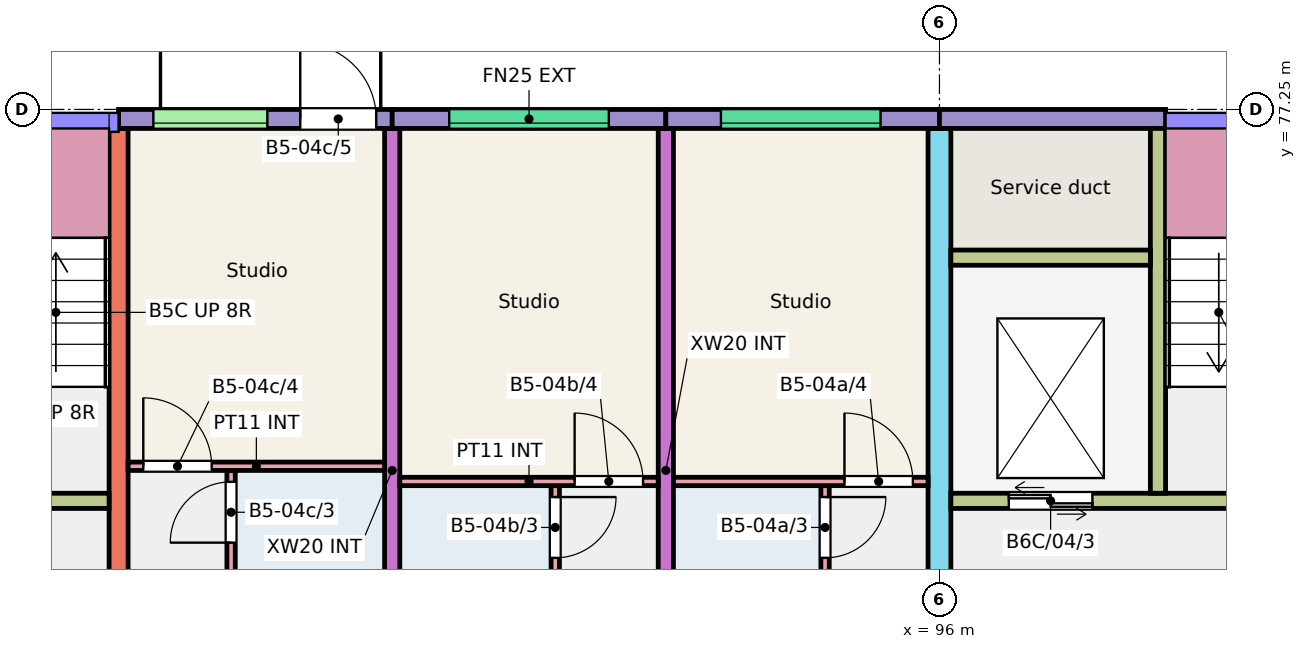
"""IFC4 building model, lengths in metres.
Left out: names, types, materials, properties, quantities, classifications, styles, units other than length and angle.
Written with IfcOpenShell. Run it as: python <this file> out.ifc"""

import sys

from ifc_helpers import new_model, si_unit, direction, frame, frame_2d, origin, place, context, subcontext, project, spatial, rectangle, extrude, element, fill, save


model = new_model("IFC4")
c1 = context("Model", 3, precision=1e-05, world=origin(), true_north=direction((0.0, 1.0)))
c2 = subcontext(c1, "Body", "Model", "MODEL_VIEW")
j1 = project(units=[si_unit("LENGTHUNIT", "METRE"), si_unit("PLANEANGLEUNIT", "RADIAN")], contexts=[c1])
p1 = place(None, origin())
s1 = spatial("IfcSite", under=j1, at=p1, CompositionType="ELEMENT")
p2 = place(p1, origin())
s2 = spatial("IfcBuilding", under=s1, at=p2, CompositionType="ELEMENT")
p3 = place(p2, frame((0.0, 0.0, 12.0)))
s3 = spatial("IfcBuildingStorey", under=s2, at=p3, CompositionType="ELEMENT", Elevation=12.0)
p4 = place(p3, frame((85.2, 68.0, 0.0), z_axis=(0.0, 0.0, 1.0), x_axis=(0.0, 1.0, 0.0)))
e1 = element("IfcWall", 1, at=p4, inside=s3, PredefinedType="SHEAR", context=c2, shape_type="SweptSolid", body=[
    extrude(rectangle(XDim=9.0, YDim=0.25, at=frame_2d((4.5, 0.0))), origin(), (0.0, 0.0, 1.0), 3.0),
])
for number, where, z_axis, x_axis in (
    (2, (88.8, 68.0, 0.0), (0.0, 0.0, 1.0), (0.0, 1.0, 0.0)),
    (3, (92.4, 68.0, 0.0), (0.0, 0.0, 1.0), (0.0, 1.0, 0.0)),
):
    element("IfcWall", number, at=place(p3, frame(where, z_axis=z_axis, x_axis=x_axis)), inside=s3, PredefinedType="SHEAR", context=c2, shape_type="SweptSolid", body=[
        extrude(rectangle(XDim=9.0, YDim=0.2, at=frame_2d((4.5, 0.0))), origin(), (0.0, 0.0, 1.0), 3.0),
    ])
p5 = place(p3, frame((96.0, 66.0, 0.0), z_axis=(0.0, 0.0, 1.0), x_axis=(0.0, 1.0, 0.0)))
e4 = element("IfcWall", 4, at=p5, inside=s3, PredefinedType="SHEAR", context=c2, shape_type="SweptSolid", body=[
    extrude(rectangle(XDim=11.0, YDim=0.3, at=frame_2d((5.5, 0.0))), origin(), (0.0, 0.0, 1.0), 3.0),
])
p6 = place(p5, frame((0.3, 0.0, 0.0)))
e5 = element("IfcOpeningElement", 5, at=p6, cuts=e4, PredefinedType="OPENING", context=c2, shape_type="SweptSolid", body=[
    extrude(rectangle(XDim=1.2, YDim=2.1, at=frame_2d((0.6, 1.05))), frame((0.0, 0.16, 0.0), z_axis=(0.0, -1.0, 0.0), x_axis=(1.0, 0.0, 0.0)), (0.0, 0.0, 1.0), 0.32),
])
p7 = place(p3, frame((79.35, 72.1, 0.0), z_axis=(0.0, 0.0, 1.0), x_axis=(1.0, 0.0, 0.0)))
e6 = element("IfcWall", 6, at=p7, inside=s3, PredefinedType="SHEAR", context=c2, shape_type="SweptSolid", body=[
    extrude(rectangle(XDim=5.725, YDim=0.2, at=frame_2d((2.862, 0.0))), origin(), (0.0, 0.0, 1.0), 3.0),
])
p8 = place(p7, frame((3.775, 0.0, 0.0)))
e7 = element("IfcOpeningElement", 7, at=p8, cuts=e6, PredefinedType="OPENING", context=c2, shape_type="SweptSolid", body=[
    extrude(rectangle(XDim=1.0, YDim=2.1, at=frame_2d((0.5, 1.05))), frame((0.0, 0.11, 0.0), z_axis=(0.0, -1.0, 0.0), x_axis=(1.0, 0.0, 0.0)), (0.0, 0.0, 1.0), 0.22),
])
p9 = place(p7, frame((0.762, 0.0, 0.0)))
e8 = element("IfcOpeningElement", 8, at=p9, cuts=e6, PredefinedType="OPENING", context=c2, shape_type="SweptSolid", body=[
    extrude(rectangle(XDim=1.1, YDim=2.1, at=frame_2d((0.55, 1.05))), frame((0.0, 0.11, 0.0), z_axis=(0.0, -1.0, 0.0), x_axis=(1.0, 0.0, 0.0)), (0.0, 0.0, 1.0), 0.22),
])
p10 = place(p3, frame((85.2, 77.125, 0.0), z_axis=(0.0, 0.0, 1.0), x_axis=(1.0, 0.0, 0.0)))
e9 = element("IfcWall", 9, at=p10, inside=s3, PredefinedType="SOLIDWALL", context=c2, shape_type="SweptSolid", body=[
    extrude(rectangle(XDim=3.6, YDim=0.25, at=frame_2d((1.8, 0.0))), origin(), (0.0, 0.0, 1.0), 3.0),
])
p11 = place(p10, frame((0.458, 0.0, 1.2)))
e10 = element("IfcOpeningElement", 10, at=p11, cuts=e9, PredefinedType="OPENING", context=c2, shape_type="SweptSolid", body=[
    extrude(rectangle(XDim=1.5, YDim=1.2, at=frame_2d((0.75, 0.6))), frame((0.0, 0.135, 0.0), z_axis=(0.0, -1.0, 0.0), x_axis=(1.0, 0.0, 0.0)), (0.0, 0.0, 1.0), 0.27),
])
p12 = place(p10, frame((2.39, 0.0, 0.0)))
e11 = element("IfcOpeningElement", 11, at=p12, cuts=e9, PredefinedType="OPENING", context=c2, shape_type="SweptSolid", body=[
    extrude(rectangle(XDim=1.0, YDim=2.1, at=frame_2d((0.5, 1.05))), frame((0.0, 0.135, 0.0), z_axis=(0.0, -1.0, 0.0), x_axis=(1.0, 0.0, 0.0)), (0.0, 0.0, 1.0), 0.27),
])
p13 = place(p3, frame((88.8, 77.125, 0.0), z_axis=(0.0, 0.0, 1.0), x_axis=(1.0, 0.0, 0.0)))
e12 = element("IfcWall", 12, at=p13, inside=s3, PredefinedType="SOLIDWALL", context=c2, shape_type="SweptSolid", body=[
    extrude(rectangle(XDim=3.6, YDim=0.25, at=frame_2d((1.8, 0.0))), origin(), (0.0, 0.0, 1.0), 3.0),
])
p14 = place(p13, frame((0.75, 0.0, 1.2)))
e13 = element("IfcOpeningElement", 13, at=p14, cuts=e12, PredefinedType="OPENING", context=c2, shape_type="SweptSolid", body=[
    extrude(rectangle(XDim=2.1, YDim=1.2, at=frame_2d((1.05, 0.6))), frame((0.0, 0.135, 0.0), z_axis=(0.0, -1.0, 0.0), x_axis=(1.0, 0.0, 0.0)), (0.0, 0.0, 1.0), 0.27),
])
p15 = place(p3, frame((92.4, 77.125, 0.0), z_axis=(0.0, 0.0, 1.0), x_axis=(1.0, 0.0, 0.0)))
e14 = element("IfcWall", 14, at=p15, inside=s3, PredefinedType="SOLIDWALL", context=c2, shape_type="SweptSolid", body=[
    extrude(rectangle(XDim=3.6, YDim=0.25, at=frame_2d((1.8, 0.0))), origin(), (0.0, 0.0, 1.0), 3.0),
])
p16 = place(p15, frame((0.725, 0.0, 1.2)))
e15 = element("IfcOpeningElement", 15, at=p16, cuts=e14, PredefinedType="OPENING", context=c2, shape_type="SweptSolid", body=[
    extrude(rectangle(XDim=2.1, YDim=1.2, at=frame_2d((1.05, 0.6))), frame((0.0, 0.135, 0.0), z_axis=(0.0, -1.0, 0.0), x_axis=(1.0, 0.0, 0.0)), (0.0, 0.0, 1.0), 0.27),
])
p17 = place(p3, frame((96.0, 77.125, 0.0), z_axis=(0.0, 0.0, 1.0), x_axis=(1.0, 0.0, 0.0)))
e16 = element("IfcWall", 16, at=p17, inside=s3, PredefinedType="SOLIDWALL", context=c2, shape_type="SweptSolid", body=[
    extrude(rectangle(XDim=2.975, YDim=0.25, at=frame_2d((1.488, 0.0))), origin(), (0.0, 0.0, 1.0), 3.0),
])
p18 = place(p3, frame((96.15, 72.1, 0.0), z_axis=(0.0, 0.0, 1.0), x_axis=(1.0, 0.0, 0.0)))
e17 = element("IfcWall", 17, at=p18, inside=s3, PredefinedType="SHEAR", context=c2, shape_type="SweptSolid", body=[
    extrude(rectangle(XDim=5.725, YDim=0.2, at=frame_2d((2.863, 0.0))), origin(), (0.0, 0.0, 1.0), 3.0),
])
p19 = place(p18, frame((3.775, 0.0, 0.0)))
e18 = element("IfcOpeningElement", 18, at=p19, cuts=e17, PredefinedType="OPENING", context=c2, shape_type="SweptSolid", body=[
    extrude(rectangle(XDim=1.0, YDim=2.1, at=frame_2d((0.5, 1.05))), frame((0.0, 0.11, 0.0), z_axis=(0.0, -1.0, 0.0), x_axis=(1.0, 0.0, 0.0)), (0.0, 0.0, 1.0), 0.22),
])
p20 = place(p18, frame((0.762, 0.0, 0.0)))
e19 = element("IfcOpeningElement", 19, at=p20, cuts=e17, PredefinedType="OPENING", context=c2, shape_type="SweptSolid", body=[
    extrude(rectangle(XDim=1.1, YDim=2.1, at=frame_2d((0.55, 1.05))), frame((0.0, 0.11, 0.0), z_axis=(0.0, -1.0, 0.0), x_axis=(1.0, 0.0, 0.0)), (0.0, 0.0, 1.0), 0.22),
])
p21 = place(p3, frame((98.875, 72.2, 0.0), z_axis=(0.0, 0.0, 1.0), x_axis=(0.0, 1.0, 0.0)))
e20 = element("IfcWall", 20, at=p21, inside=s3, PredefinedType="SHEAR", context=c2, shape_type="SweptSolid", body=[
    extrude(rectangle(XDim=4.8, YDim=0.2, at=frame_2d((2.4, 0.0))), origin(), (0.0, 0.0, 1.0), 3.0),
])
p22 = place(p3, frame((96.15, 75.3, 0.0), z_axis=(0.0, 0.0, 1.0), x_axis=(1.0, 0.0, 0.0)))
e21 = element("IfcWall", 21, at=p22, inside=s3, PredefinedType="SHEAR", context=c2, shape_type="SweptSolid", body=[
    extrude(rectangle(XDim=2.625, YDim=0.2, at=frame_2d((1.312, 0.0))), origin(), (0.0, 0.0, 1.0), 3.0),
])
p23 = place(p3, frame((94.495, 68.0, 0.0), z_axis=(0.0, 0.0, 1.0), x_axis=(0.0, 1.0, 0.0)))
e22 = element("IfcWall", 22, at=p23, inside=s3, PredefinedType="PARTITIONING", context=c2, shape_type="SweptSolid", body=[
    extrude(rectangle(XDim=4.3, YDim=0.11, at=frame_2d((2.15, 0.0))), origin(), (0.0, 0.0, 1.0), 2.8),
])
p24 = place(p23, frame((0.2, 0.0, 0.0)))
e23 = element("IfcOpeningElement", 23, at=p24, cuts=e22, PredefinedType="OPENING", context=c2, shape_type="SweptSolid", body=[
    extrude(rectangle(XDim=0.8, YDim=2.1, at=frame_2d((0.4, 1.05))), frame((0.0, 0.065, 0.0), z_axis=(0.0, -1.0, 0.0), x_axis=(1.0, 0.0, 0.0)), (0.0, 0.0, 1.0), 0.13),
])
p25 = place(p23, frame((3.35, 0.0, 0.0)))
e24 = element("IfcOpeningElement", 24, at=p25, cuts=e22, PredefinedType="OPENING", context=c2, shape_type="SweptSolid", body=[
    extrude(rectangle(XDim=0.8, YDim=2.1, at=frame_2d((0.4, 1.05))), frame((0.0, 0.065, 0.0), z_axis=(0.0, -1.0, 0.0), x_axis=(1.0, 0.0, 0.0)), (0.0, 0.0, 1.0), 0.13),
])
p26 = place(p3, frame((92.5, 72.355, 0.0), z_axis=(0.0, 0.0, 1.0), x_axis=(1.0, 0.0, 0.0)))
e25 = element("IfcWall", 25, at=p26, inside=s3, PredefinedType="PARTITIONING", context=c2, shape_type="SweptSolid", body=[
    extrude(rectangle(XDim=3.35, YDim=0.11, at=frame_2d((1.675, 0.0))), origin(), (0.0, 0.0, 1.0), 2.8),
])
p27 = place(p26, frame((2.25, 0.0, 0.0)))
e26 = element("IfcOpeningElement", 26, at=p27, cuts=e25, PredefinedType="OPENING", context=c2, shape_type="SweptSolid", body=[
    extrude(rectangle(XDim=0.9, YDim=2.1, at=frame_2d((0.45, 1.05))), frame((0.0, 0.065, 0.0), z_axis=(0.0, -1.0, 0.0), x_axis=(1.0, 0.0, 0.0)), (0.0, 0.0, 1.0), 0.13),
])
p28 = place(p3, frame((90.945, 68.0, 0.0), z_axis=(0.0, 0.0, 1.0), x_axis=(0.0, 1.0, 0.0)))
e27 = element("IfcWall", 27, at=p28, inside=s3, PredefinedType="PARTITIONING", context=c2, shape_type="SweptSolid", body=[
    extrude(rectangle(XDim=4.3, YDim=0.11, at=frame_2d((2.15, 0.0))), origin(), (0.0, 0.0, 1.0), 2.8),
])
p29 = place(p28, frame((0.2, 0.0, 0.0)))
e28 = element("IfcOpeningElement", 28, at=p29, cuts=e27, PredefinedType="OPENING", context=c2, shape_type="SweptSolid", body=[
    extrude(rectangle(XDim=0.8, YDim=2.1, at=frame_2d((0.4, 1.05))), frame((0.0, 0.065, 0.0), z_axis=(0.0, -1.0, 0.0), x_axis=(1.0, 0.0, 0.0)), (0.0, 0.0, 1.0), 0.13),
])
p30 = place(p28, frame((3.35, 0.0, 0.0)))
e29 = element("IfcOpeningElement", 29, at=p30, cuts=e27, PredefinedType="OPENING", context=c2, shape_type="SweptSolid", body=[
    extrude(rectangle(XDim=0.8, YDim=2.1, at=frame_2d((0.4, 1.05))), frame((0.0, 0.065, 0.0), z_axis=(0.0, -1.0, 0.0), x_axis=(1.0, 0.0, 0.0)), (0.0, 0.0, 1.0), 0.13),
])
p31 = place(p3, frame((88.9, 72.355, 0.0), z_axis=(0.0, 0.0, 1.0), x_axis=(1.0, 0.0, 0.0)))
e30 = element("IfcWall", 30, at=p31, inside=s3, PredefinedType="PARTITIONING", context=c2, shape_type="SweptSolid", body=[
    extrude(rectangle(XDim=3.4, YDim=0.11, at=frame_2d((1.7, 0.0))), origin(), (0.0, 0.0, 1.0), 2.8),
])
p32 = place(p31, frame((2.3, 0.0, 0.0)))
e31 = element("IfcOpeningElement", 31, at=p32, cuts=e30, PredefinedType="OPENING", context=c2, shape_type="SweptSolid", body=[
    extrude(rectangle(XDim=0.9, YDim=2.1, at=frame_2d((0.45, 1.05))), frame((0.0, 0.065, 0.0), z_axis=(0.0, -1.0, 0.0), x_axis=(1.0, 0.0, 0.0)), (0.0, 0.0, 1.0), 0.13),
])
p33 = place(p3, frame((86.68, 68.0, 0.0), z_axis=(0.0, 0.0, 1.0), x_axis=(0.0, 1.0, 0.0)))
e32 = element("IfcWall", 32, at=p33, inside=s3, PredefinedType="PARTITIONING", context=c2, shape_type="SweptSolid", body=[
    extrude(rectangle(XDim=4.5, YDim=0.11, at=frame_2d((2.25, 0.0))), origin(), (0.0, 0.0, 1.0), 2.8),
])
p34 = place(p33, frame((0.2, 0.0, 0.0)))
e33 = element("IfcOpeningElement", 33, at=p34, cuts=e32, PredefinedType="OPENING", context=c2, shape_type="SweptSolid", body=[
    extrude(rectangle(XDim=0.8, YDim=2.1, at=frame_2d((0.4, 1.05))), frame((0.0, 0.065, 0.0), z_axis=(0.0, -1.0, 0.0), x_axis=(1.0, 0.0, 0.0)), (0.0, 0.0, 1.0), 0.13),
])
p35 = place(p33, frame((3.55, 0.0, 0.0)))
e34 = element("IfcOpeningElement", 34, at=p35, cuts=e32, PredefinedType="OPENING", context=c2, shape_type="SweptSolid", body=[
    extrude(rectangle(XDim=0.8, YDim=2.1, at=frame_2d((0.4, 1.05))), frame((0.0, 0.065, 0.0), z_axis=(0.0, -1.0, 0.0), x_axis=(1.0, 0.0, 0.0)), (0.0, 0.0, 1.0), 0.13),
])
p36 = place(p3, frame((85.325, 72.555, 0.0), z_axis=(0.0, 0.0, 1.0), x_axis=(1.0, 0.0, 0.0)))
e35 = element("IfcWall", 35, at=p36, inside=s3, PredefinedType="PARTITIONING", context=c2, shape_type="SweptSolid", body=[
    extrude(rectangle(XDim=3.375, YDim=0.11, at=frame_2d((1.688, 0.0))), origin(), (0.0, 0.0, 1.0), 2.8),
])
p37 = place(p36, frame((0.2, 0.0, 0.0)))
e36 = element("IfcOpeningElement", 36, at=p37, cuts=e35, PredefinedType="OPENING", context=c2, shape_type="SweptSolid", body=[
    extrude(rectangle(XDim=0.9, YDim=2.1, at=frame_2d((0.45, 1.05))), frame((0.0, 0.065, 0.0), z_axis=(0.0, -1.0, 0.0), x_axis=(1.0, 0.0, 0.0)), (0.0, 0.0, 1.0), 0.13),
])
p38 = place(p16, origin())
e37 = element("IfcWindow", 37, at=p38, inside=s3, PartitioningType="SINGLE_PANEL", PredefinedType="WINDOW", context=c2, shape_type="SweptSolid", body=[
    extrude(rectangle(XDim=2.1, YDim=1.2, at=frame_2d((1.05, 0.6))), frame((0.0, -0.025, 0.0), z_axis=(0.0, -1.0, 0.0), x_axis=(1.0, 0.0, 0.0)), (0.0, 0.0, 1.0), 0.06),
])
fill(e15, e37)
p39 = place(p14, origin())
e38 = element("IfcWindow", 38, at=p39, inside=s3, PartitioningType="SINGLE_PANEL", PredefinedType="WINDOW", context=c2, shape_type="SweptSolid", body=[
    extrude(rectangle(XDim=2.1, YDim=1.2, at=frame_2d((1.05, 0.6))), frame((0.0, -0.025, 0.0), z_axis=(0.0, -1.0, 0.0), x_axis=(1.0, 0.0, 0.0)), (0.0, 0.0, 1.0), 0.06),
])
fill(e13, e38)
p40 = place(p11, origin())
e39 = element("IfcWindow", 39, at=p40, inside=s3, PartitioningType="SINGLE_PANEL", PredefinedType="WINDOW", context=c2, shape_type="SweptSolid", body=[
    extrude(rectangle(XDim=1.5, YDim=1.2, at=frame_2d((0.75, 0.6))), frame((0.0, -0.025, 0.0), z_axis=(0.0, -1.0, 0.0), x_axis=(1.0, 0.0, 0.0)), (0.0, 0.0, 1.0), 0.06),
])
fill(e10, e39)
p41 = place(p25, origin())
e40 = element("IfcDoor", 40, at=p41, inside=s3, OperationType="SINGLE_SWING_RIGHT", PredefinedType="DOOR", context=c2, shape_type="SweptSolid", body=[
    extrude(rectangle(XDim=0.8, YDim=2.1, at=frame_2d((0.4, 1.05))), frame((0.0, 0.025, 0.0), z_axis=(0.0, -1.0, 0.0), x_axis=(1.0, 0.0, 0.0)), (0.0, 0.0, 1.0), 0.05),
])
fill(e24, e40)
p42 = place(p27, origin())
e41 = element("IfcDoor", 41, at=p42, inside=s3, OperationType="SINGLE_SWING_LEFT", PredefinedType="DOOR", context=c2, shape_type="SweptSolid", body=[
    extrude(rectangle(XDim=0.9, YDim=2.1, at=frame_2d((0.45, 1.05))), frame((0.0, 0.025, 0.0), z_axis=(0.0, -1.0, 0.0), x_axis=(1.0, 0.0, 0.0)), (0.0, 0.0, 1.0), 0.05),
])
fill(e26, e41)
p43 = place(p30, origin())
e42 = element("IfcDoor", 42, at=p43, inside=s3, OperationType="SINGLE_SWING_RIGHT", PredefinedType="DOOR", context=c2, shape_type="SweptSolid", body=[
    extrude(rectangle(XDim=0.8, YDim=2.1, at=frame_2d((0.4, 1.05))), frame((0.0, 0.025, 0.0), z_axis=(0.0, -1.0, 0.0), x_axis=(1.0, 0.0, 0.0)), (0.0, 0.0, 1.0), 0.05),
])
fill(e29, e42)
p44 = place(p32, origin())
e43 = element("IfcDoor", 43, at=p44, inside=s3, OperationType="SINGLE_SWING_LEFT", PredefinedType="DOOR", context=c2, shape_type="SweptSolid", body=[
    extrude(rectangle(XDim=0.9, YDim=2.1, at=frame_2d((0.45, 1.05))), frame((0.0, 0.025, 0.0), z_axis=(0.0, -1.0, 0.0), x_axis=(1.0, 0.0, 0.0)), (0.0, 0.0, 1.0), 0.05),
])
fill(e31, e43)
p45 = place(p35, origin())
e44 = element("IfcDoor", 44, at=p45, inside=s3, OperationType="SINGLE_SWING_LEFT", PredefinedType="DOOR", context=c2, shape_type="SweptSolid", body=[
    extrude(rectangle(XDim=0.8, YDim=2.1, at=frame_2d((0.4, 1.05))), frame((0.0, 0.025, 0.0), z_axis=(0.0, -1.0, 0.0), x_axis=(1.0, 0.0, 0.0)), (0.0, 0.0, 1.0), 0.05),
])
fill(e34, e44)
p46 = place(p37, origin())
e45 = element("IfcDoor", 45, at=p46, inside=s3, OperationType="SINGLE_SWING_LEFT", PredefinedType="DOOR", context=c2, shape_type="SweptSolid", body=[
    extrude(rectangle(XDim=0.9, YDim=2.1, at=frame_2d((0.45, 1.05))), frame((0.0, 0.025, 0.0), z_axis=(0.0, -1.0, 0.0), x_axis=(1.0, 0.0, 0.0)), (0.0, 0.0, 1.0), 0.05),
])
fill(e36, e45)
p47 = place(p12, origin())
e46 = element("IfcDoor", 46, at=p47, inside=s3, OperationType="SINGLE_SWING_LEFT", PredefinedType="DOOR", context=c2, shape_type="SweptSolid", body=[
    extrude(rectangle(XDim=1.0, YDim=2.1, at=frame_2d((0.5, 1.05))), frame((0.0, 0.025, 0.0), z_axis=(0.0, -1.0, 0.0), x_axis=(1.0, 0.0, 0.0)), (0.0, 0.0, 1.0), 0.05),
])
fill(e11, e46)
p48 = place(p20, origin())
e47 = element("IfcDoor", 47, at=p48, inside=s3, OperationType="DOUBLE_DOOR_SLIDING", PredefinedType="DOOR", context=c2, shape_type="SweptSolid", body=[
    extrude(rectangle(XDim=1.1, YDim=2.1, at=frame_2d((0.55, 1.05))), frame((0.0, 0.025, 0.0), z_axis=(0.0, -1.0, 0.0), x_axis=(1.0, 0.0, 0.0)), (0.0, 0.0, 1.0), 0.05),
])
fill(e19, e47)
save(model, sys.argv[1])
